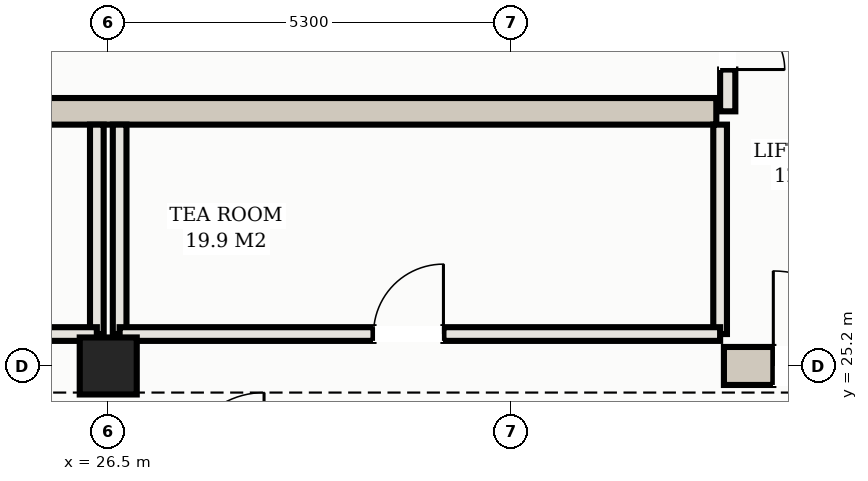
"""IFC4 building model, lengths in metres.
Left out: names, types, materials, properties, quantities, classifications, styles, units other than length and angle.
Written with IfcOpenShell. Run it as: python <this file> out.ifc"""

import sys

from ifc_helpers import new_model, si_unit, direction, frame, frame_2d, origin, origin_2d, place, context, subcontext, project, spatial, rectangle, hollow_rectangle, extrude, element, fill, save


model = new_model("IFC4")
c1 = context("Model", 3, precision=1e-05, world=origin(), true_north=direction((0.0, 1.0)))
c2 = subcontext(c1, "Body", "Model", "MODEL_VIEW")
j1 = project(units=[si_unit("LENGTHUNIT", "METRE"), si_unit("PLANEANGLEUNIT", "RADIAN")], contexts=[c1])
p1 = place(None, origin())
s1 = spatial("IfcSite", under=j1, at=p1, CompositionType="ELEMENT")
p2 = place(p1, origin())
s2 = spatial("IfcBuilding", under=s1, at=p2, CompositionType="ELEMENT")
p3 = place(p2, frame((0.0, 0.0, 229.7)))
s3 = spatial("IfcBuildingStorey", under=s2, at=p3, CompositionType="ELEMENT", Elevation=229.7)
p4 = place(p3, frame((34.6, 25.2, 0.0), z_axis=(0.0, 0.0, 1.0), x_axis=(1.0, 0.0, 0.0)))
e1 = element("IfcWall", 1, at=p4, inside=s3, PredefinedType="SHEAR", context=c2, shape_type="SweptSolid", body=[
    extrude(rectangle(XDim=8.05, YDim=0.5, at=frame_2d((4.025, 0.0))), origin(), (0.0, 0.0, 1.0), 3.11),
])
p5 = place(p4, frame((0.65, 0.0, 0.0)))
e2 = element("IfcOpeningElement", 2, at=p5, cuts=e1, PredefinedType="OPENING", context=c2, shape_type="SweptSolid", body=[
    extrude(rectangle(XDim=1.25, YDim=2.2, at=frame_2d((0.625, 1.1))), frame((0.0, 0.26, 0.0), z_axis=(0.0, -1.0, 0.0), x_axis=(1.0, 0.0, 0.0)), (0.0, 0.0, 1.0), 0.52),
])
p6 = place(p3, frame((18.5, 28.55, 0.0), z_axis=(0.0, 0.0, 1.0), x_axis=(1.0, 0.0, 0.0)))
e3 = element("IfcWall", 3, at=p6, inside=s3, PredefinedType="SHEAR", context=c2, shape_type="SweptSolid", body=[
    extrude(rectangle(XDim=16.0, YDim=0.35, at=frame_2d((8.0, 0.0))), origin(), (0.0, 0.0, 1.0), 3.11),
])
p7 = place(p3, frame((26.5, 25.2, 0.0), z_axis=(0.0, 0.0, 1.0), x_axis=(1.0, 0.0, 0.0)))
e4 = element("IfcColumn", 4, at=p7, inside=s3, PredefinedType="COLUMN", context=c2, shape_type="SweptSolid", body=[
    extrude(hollow_rectangle(XDim=0.75, YDim=0.75, WallThickness=0.025, at=origin_2d()), origin(), (0.0, 0.0, 1.0), 3.3),
])
p8 = place(p3, frame((34.65, 28.55, 0.0), z_axis=(0.0, 0.0, 1.0), x_axis=(0.0, 1.0, 0.0)))
e5 = element("IfcWall", 5, at=p8, inside=s3, PredefinedType="PARTITIONING", context=c2, shape_type="SweptSolid", body=[
    extrude(rectangle(XDim=2.6, YDim=0.2, at=frame_2d((1.3, 0.0))), origin(), (0.0, 0.0, 1.0), 2.43),
])
p9 = place(p8, frame((0.55, 0.0, 0.0)))
e6 = element("IfcOpeningElement", 6, at=p9, cuts=e5, PredefinedType="OPENING", context=c2, shape_type="SweptSolid", body=[
    extrude(rectangle(XDim=1.5, YDim=2.25, at=frame_2d((0.75, 1.125))), frame((0.0, 0.11, 0.0), z_axis=(0.0, -1.0, 0.0), x_axis=(1.0, 0.0, 0.0)), (0.0, 0.0, 1.0), 0.22),
])
p10 = place(p3, frame((26.35, 25.62, 0.0), z_axis=(0.0, 0.0, 1.0), x_axis=(0.0, 1.0, 0.0)))
e7 = element("IfcWall", 7, at=p10, inside=s3, PredefinedType="PARTITIONING", context=c2, shape_type="SweptSolid", body=[
    extrude(rectangle(XDim=2.755, YDim=0.18, at=frame_2d((1.377, 0.0))), origin(), (0.0, 0.0, 1.0), 2.43),
])
p11 = place(p3, frame((18.45, 25.62, 0.0), z_axis=(0.0, 0.0, 1.0), x_axis=(1.0, 0.0, 0.0)))
e8 = element("IfcWall", 8, at=p11, inside=s3, PredefinedType="PARTITIONING", context=c2, shape_type="SweptSolid", body=[
    extrude(rectangle(XDim=7.9, YDim=0.18, at=frame_2d((3.95, 0.0))), origin(), (0.0, 0.0, 1.0), 2.43),
])
p12 = place(p11, frame((3.34, 0.0, 0.0)))
e9 = element("IfcOpeningElement", 9, at=p12, cuts=e8, PredefinedType="OPENING", context=c2, shape_type="SweptSolid", body=[
    extrude(rectangle(XDim=0.92, YDim=2.15, at=frame_2d((0.46, 1.075))), frame((0.0, 0.1, 0.0), z_axis=(0.0, -1.0, 0.0), x_axis=(1.0, 0.0, 0.0)), (0.0, 0.0, 1.0), 0.2),
])
for number, where, z_axis, x_axis in (
    (10, (26.65, 25.62, 0.0), (0.0, 0.0, 1.0), (0.0, 1.0, 0.0)),
    (11, (34.55, 25.62, 0.0), (0.0, 0.0, 1.0), (0.0, 1.0, 0.0)),
):
    element("IfcWall", number, at=place(p3, frame(where, z_axis=z_axis, x_axis=x_axis)), inside=s3, PredefinedType="PARTITIONING", context=c2, shape_type="SweptSolid", body=[
        extrude(rectangle(XDim=2.755, YDim=0.18, at=frame_2d((1.377, 0.0))), origin(), (0.0, 0.0, 1.0), 2.43),
    ])
p13 = place(p3, frame((26.65, 25.62, 0.0), z_axis=(0.0, 0.0, 1.0), x_axis=(1.0, 0.0, 0.0)))
e12 = element("IfcWall", 12, at=p13, inside=s3, PredefinedType="PARTITIONING", context=c2, shape_type="SweptSolid", body=[
    extrude(rectangle(XDim=7.9, YDim=0.18, at=frame_2d((3.95, 0.0))), origin(), (0.0, 0.0, 1.0), 2.43),
])
p14 = place(p13, frame((3.34, 0.0, 0.0)))
e13 = element("IfcOpeningElement", 13, at=p14, cuts=e12, PredefinedType="OPENING", context=c2, shape_type="SweptSolid", body=[
    extrude(rectangle(XDim=0.92, YDim=2.15, at=frame_2d((0.46, 1.075))), frame((0.0, 0.1, 0.0), z_axis=(0.0, -1.0, 0.0), x_axis=(1.0, 0.0, 0.0)), (0.0, 0.0, 1.0), 0.2),
])
p15 = place(p5, origin())
e14 = element("IfcDoor", 14, at=p15, inside=s3, OperationType="SINGLE_SWING_LEFT", PredefinedType="DOOR", context=c2, shape_type="SweptSolid", body=[
    extrude(rectangle(XDim=1.25, YDim=2.2, at=frame_2d((0.625, 1.1))), frame((0.0, 0.025, 0.0), z_axis=(0.0, -1.0, 0.0), x_axis=(1.0, 0.0, 0.0)), (0.0, 0.0, 1.0), 0.05),
])
fill(e2, e14)
p16 = place(p9, frame((1.5, 0.0, 0.0), z_axis=(0.0, 0.0, 1.0), x_axis=(-1.0, 0.0, 0.0)))
e15 = element("IfcDoor", 15, at=p16, inside=s3, OperationType="DOUBLE_DOOR_SINGLE_SWING", PredefinedType="DOOR", context=c2, shape_type="SweptSolid", body=[
    extrude(rectangle(XDim=1.5, YDim=2.25, at=frame_2d((0.75, 1.125))), frame((0.0, 0.025, 0.0), z_axis=(0.0, -1.0, 0.0), x_axis=(1.0, 0.0, 0.0)), (0.0, 0.0, 1.0), 0.05),
])
fill(e6, e15)
p17 = place(p14, origin())
e16 = element("IfcDoor", 16, at=p17, inside=s3, OperationType="SINGLE_SWING_RIGHT", PredefinedType="DOOR", context=c2, shape_type="SweptSolid", body=[
    extrude(rectangle(XDim=0.92, YDim=2.15, at=frame_2d((0.46, 1.075))), frame((0.0, 0.025, 0.0), z_axis=(0.0, -1.0, 0.0), x_axis=(1.0, 0.0, 0.0)), (0.0, 0.0, 1.0), 0.05),
])
fill(e13, e16)
save(model, sys.argv[1])
